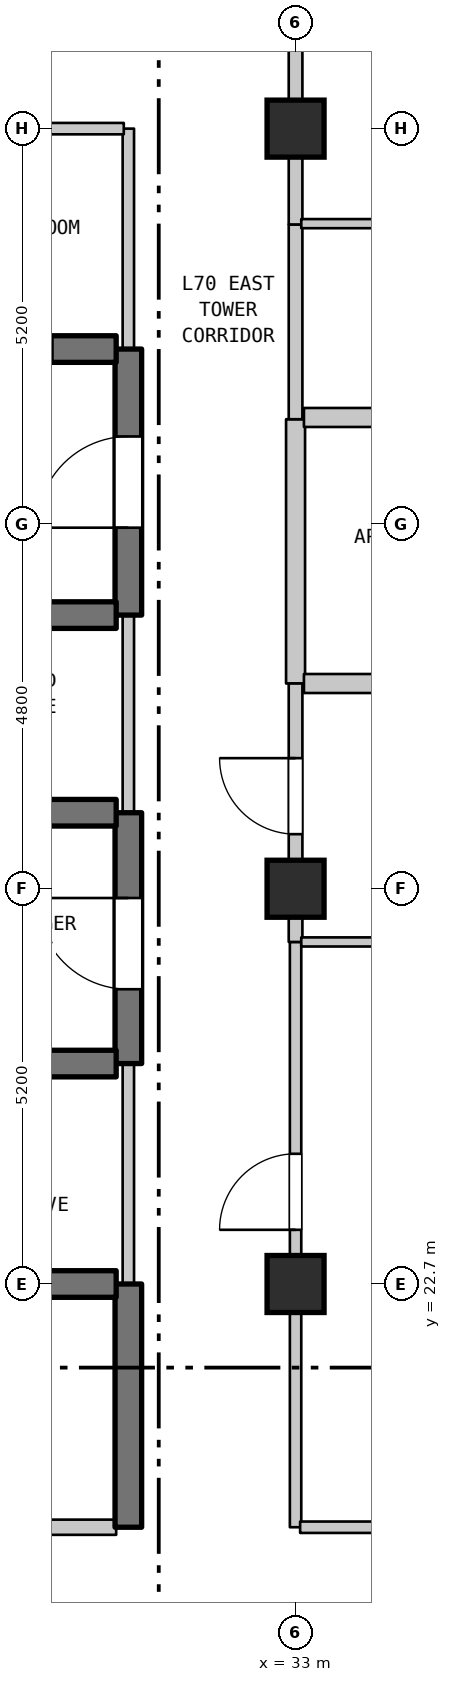
"""IFC4 building model, lengths in metres.
Left out: names, types, materials, properties, quantities, classifications, styles, units other than length and angle.
Written with IfcOpenShell. Run it as: python <this file> out.ifc"""

import sys

from ifc_helpers import new_model, si_unit, direction, frame, frame_2d, origin, origin_2d, place, context, subcontext, project, spatial, rectangle, extrude, element, fill, save


model = new_model("IFC4")
c1 = context("Model", 3, precision=1e-05, world=origin(), true_north=direction((0.0, 1.0)))
c2 = subcontext(c1, "Body", "Model", "MODEL_VIEW")
j1 = project(units=[si_unit("LENGTHUNIT", "METRE"), si_unit("PLANEANGLEUNIT", "RADIAN")], contexts=[c1])
p1 = place(None, origin())
s1 = spatial("IfcSite", under=j1, at=p1, CompositionType="ELEMENT")
p2 = place(p1, origin())
s2 = spatial("IfcBuilding", under=s1, at=p2, CompositionType="ELEMENT")
p3 = place(p2, frame((0.0, 0.0, 280.6)))
s3 = spatial("IfcBuildingStorey", under=s2, at=p3, CompositionType="ELEMENT", Elevation=280.6)
for number, where, z_axis, x_axis in (
    (1, (33.0, 22.7, 0.0), (0.0, 0.0, 1.0), (1.0, 0.0, 0.0)),
    (2, (33.0, 27.9, 0.0), (0.0, 0.0, 1.0), (1.0, 0.0, 0.0)),
    (3, (33.0, 37.9, 0.0), (0.0, 0.0, 1.0), (1.0, 0.0, 0.0)),
):
    element("IfcColumn", number, at=place(p3, frame(where, z_axis=z_axis, x_axis=x_axis)), inside=s3, PredefinedType="COLUMN", context=c2, shape_type="SweptSolid", body=[
        extrude(rectangle(XDim=0.75, YDim=0.75, at=origin_2d()), origin(), (0.0, 0.0, 1.0), 3.7),
    ])
p4 = place(p3, frame((30.8, 19.5, 0.0), z_axis=(0.0, 0.0, 1.0), x_axis=(0.0, 1.0, 0.0)))
e4 = element("IfcWall", 4, at=p4, inside=s3, PredefinedType="SHEAR", context=c2, shape_type="SweptSolid", body=[
    extrude(rectangle(XDim=3.2, YDim=0.35, at=frame_2d((1.6, 0.0))), origin(), (0.0, 0.0, 1.0), 3.39),
])
p5 = place(p3, frame((30.8, 22.7, 0.0), z_axis=(0.0, 0.0, 1.0), x_axis=(0.0, 1.0, 0.0)))
e5 = element("IfcWall", 5, at=p5, inside=s3, PredefinedType="STANDARD", context=c2, shape_type="SweptSolid", body=[
    extrude(rectangle(XDim=2.9, YDim=0.15, at=frame_2d((1.45, 0.0))), origin(), (0.0, 0.0, 1.0), 3.39),
])
p6 = place(p3, frame((30.8, 25.6, 0.0), z_axis=(0.0, 0.0, 1.0), x_axis=(0.0, 1.0, 0.0)))
e6 = element("IfcWall", 6, at=p6, inside=s3, PredefinedType="SHEAR", context=c2, shape_type="SweptSolid", body=[
    extrude(rectangle(XDim=3.3, YDim=0.35, at=frame_2d((1.65, 0.0))), origin(), (0.0, 0.0, 1.0), 3.39),
])
p7 = place(p6, frame((0.978, 0.0, 0.0)))
e7 = element("IfcOpeningElement", 7, at=p7, cuts=e6, PredefinedType="OPENING", context=c2, shape_type="SweptSolid", body=[
    extrude(rectangle(XDim=1.2, YDim=2.2, at=frame_2d((0.6, 1.1))), frame((0.0, 0.185, 0.0), z_axis=(0.0, -1.0, 0.0), x_axis=(1.0, 0.0, 0.0)), (0.0, 0.0, 1.0), 0.37),
])
p8 = place(p3, frame((30.8, 28.9, 0.0), z_axis=(0.0, 0.0, 1.0), x_axis=(0.0, 1.0, 0.0)))
e8 = element("IfcWall", 8, at=p8, inside=s3, PredefinedType="STANDARD", context=c2, shape_type="SweptSolid", body=[
    extrude(rectangle(XDim=2.6, YDim=0.15, at=frame_2d((1.3, 0.0))), origin(), (0.0, 0.0, 1.0), 3.39),
])
p9 = place(p3, frame((30.8, 31.5, 0.0), z_axis=(0.0, 0.0, 1.0), x_axis=(0.0, 1.0, 0.0)))
e9 = element("IfcWall", 9, at=p9, inside=s3, PredefinedType="SHEAR", context=c2, shape_type="SweptSolid", body=[
    extrude(rectangle(XDim=3.5, YDim=0.35, at=frame_2d((1.75, 0.0))), origin(), (0.0, 0.0, 1.0), 3.39),
])
p10 = place(p9, frame((1.15, 0.0, 0.0)))
e10 = element("IfcOpeningElement", 10, at=p10, cuts=e9, PredefinedType="OPENING", context=c2, shape_type="SweptSolid", body=[
    extrude(rectangle(XDim=1.2, YDim=2.2, at=frame_2d((0.6, 1.1))), frame((0.0, 0.185, 0.0), z_axis=(0.0, -1.0, 0.0), x_axis=(1.0, 0.0, 0.0)), (0.0, 0.0, 1.0), 0.37),
])
p11 = place(p3, frame((30.8, 35.0, 0.0), z_axis=(0.0, 0.0, 1.0), x_axis=(0.0, 1.0, 0.0)))
e11 = element("IfcWall", 11, at=p11, inside=s3, PredefinedType="STANDARD", context=c2, shape_type="SweptSolid", body=[
    extrude(rectangle(XDim=2.9, YDim=0.15, at=frame_2d((1.45, 0.0))), origin(), (0.0, 0.0, 1.0), 3.39),
])
p12 = place(p3, frame((33.0, 19.5, 0.0), z_axis=(0.0, 0.0, 1.0), x_axis=(0.0, 1.0, 0.0)))
e12 = element("IfcWall", 12, at=p12, inside=s3, PredefinedType="STANDARD", context=c2, shape_type="SweptSolid", body=[
    extrude(rectangle(XDim=7.7, YDim=0.15, at=frame_2d((3.85, 0.0))), origin(), (0.0, 0.0, 1.0), 3.1),
])
p13 = place(p12, frame((3.913, 0.0, 0.0)))
e13 = element("IfcOpeningElement", 13, at=p13, cuts=e12, PredefinedType="OPENING", context=c2, shape_type="SweptSolid", body=[
    extrude(rectangle(XDim=1.0, YDim=2.15, at=frame_2d((0.5, 1.075))), frame((0.0, 0.085, 0.0), z_axis=(0.0, -1.0, 0.0), x_axis=(1.0, 0.0, 0.0)), (0.0, 0.0, 1.0), 0.17),
])
p14 = place(p3, frame((33.0, 27.2, 0.0), z_axis=(0.0, 0.0, 1.0), x_axis=(0.0, 1.0, 0.0)))
e14 = element("IfcWall", 14, at=p14, inside=s3, PredefinedType="STANDARD", context=c2, shape_type="SweptSolid", body=[
    extrude(rectangle(XDim=0.7, YDim=0.18, at=frame_2d((0.35, 0.0))), origin(), (0.0, 0.0, 1.0), 3.1),
])
p15 = place(p3, frame((33.0, 30.6, 0.0), z_axis=(0.0, 0.0, 1.0), x_axis=(0.0, 1.0, 0.0)))
e15 = element("IfcWall", 15, at=p15, inside=s3, PredefinedType="STANDARD", context=c2, shape_type="SweptSolid", body=[
    extrude(rectangle(XDim=3.477, YDim=0.25, at=frame_2d((1.738, 0.0))), origin(), (0.0, 0.0, 1.0), 2.89),
])
p16 = place(p3, frame((33.0, 34.077, 0.0), z_axis=(0.0, 0.0, 1.0), x_axis=(0.0, 1.0, 0.0)))
e16 = element("IfcWall", 16, at=p16, inside=s3, PredefinedType="STANDARD", context=c2, shape_type="SweptSolid", body=[
    extrude(rectangle(XDim=2.562, YDim=0.18, at=frame_2d((1.281, 0.0))), origin(), (0.0, 0.0, 1.0), 2.89),
])
p17 = place(p3, frame((33.0, 36.639, 0.0), z_axis=(0.0, 0.0, 1.0), x_axis=(0.0, 1.0, 0.0)))
e17 = element("IfcWall", 17, at=p17, inside=s3, PredefinedType="STANDARD", context=c2, shape_type="SweptSolid", body=[
    extrude(rectangle(XDim=1.261, YDim=0.18, at=frame_2d((0.63, 0.0))), origin(), (0.0, 0.0, 1.0), 2.89),
])
p18 = place(p3, frame((25.985, 19.5, 0.0), z_axis=(0.0, 0.0, 1.0), x_axis=(1.0, 0.0, 0.0)))
e18 = element("IfcWall", 18, at=p18, inside=s3, PredefinedType="STANDARD", context=c2, shape_type="SweptSolid", body=[
    extrude(rectangle(XDim=4.655, YDim=0.2, at=frame_2d((2.327, 0.0))), origin(), (0.0, 0.0, 1.0), 3.39),
])
p19 = place(p18, frame((1.845, 0.0, 0.0)))
e19 = element("IfcOpeningElement", 19, at=p19, cuts=e18, PredefinedType="OPENING", context=c2, shape_type="SweptSolid", body=[
    extrude(rectangle(XDim=0.9, YDim=2.15, at=frame_2d((0.45, 1.075))), frame((0.0, 0.11, 0.0), z_axis=(0.0, -1.0, 0.0), x_axis=(1.0, 0.0, 0.0)), (0.0, 0.0, 1.0), 0.22),
])
p20 = place(p3, frame((33.06, 19.5, 0.0), z_axis=(0.0, 0.0, 1.0), x_axis=(1.0, 0.0, 0.0)))
e20 = element("IfcWall", 20, at=p20, inside=s3, PredefinedType="STANDARD", context=c2, shape_type="SweptSolid", body=[
    extrude(rectangle(XDim=8.323, YDim=0.15, at=frame_2d((4.162, 0.0))), origin(), (0.0, 0.0, 1.0), 3.39),
])
p21 = place(p20, frame((3.583, 0.0, 0.0)))
e21 = element("IfcOpeningElement", 21, at=p21, cuts=e20, PredefinedType="OPENING", context=c2, shape_type="SweptSolid", body=[
    extrude(rectangle(XDim=1.0, YDim=2.15, at=frame_2d((0.5, 1.075))), frame((0.0, 0.085, 0.0), z_axis=(0.0, -1.0, 0.0), x_axis=(1.0, 0.0, 0.0)), (0.0, 0.0, 1.0), 0.17),
])
p22 = place(p3, frame((27.46, 22.7, 0.0), z_axis=(0.0, 0.0, 1.0), x_axis=(1.0, 0.0, 0.0)))
e22 = element("IfcWall", 22, at=p22, inside=s3, PredefinedType="SHEAR", context=c2, shape_type="SweptSolid", body=[
    extrude(rectangle(XDim=3.18, YDim=0.35, at=frame_2d((1.59, 0.0))), origin(), (0.0, 0.0, 1.0), 3.39),
])
p23 = place(p3, frame((27.46, 25.6, 0.0), z_axis=(0.0, 0.0, 1.0), x_axis=(1.0, 0.0, 0.0)))
e23 = element("IfcWall", 23, at=p23, inside=s3, PredefinedType="SHEAR", context=c2, shape_type="SweptSolid", body=[
    extrude(rectangle(XDim=3.18, YDim=0.35, at=frame_2d((1.59, 0.0))), origin(), (0.0, 0.0, 1.0), 3.39),
])
p24 = place(p23, frame((1.115, 0.0, 0.0)))
e24 = element("IfcOpeningElement", 24, at=p24, cuts=e23, PredefinedType="OPENING", context=c2, shape_type="SweptSolid", body=[
    extrude(rectangle(XDim=0.95, YDim=2.15, at=frame_2d((0.475, 1.075))), frame((0.0, 0.185, 0.0), z_axis=(0.0, -1.0, 0.0), x_axis=(1.0, 0.0, 0.0)), (0.0, 0.0, 1.0), 0.37),
])
p25 = place(p3, frame((33.075, 27.2, 0.0), z_axis=(0.0, 0.0, 1.0), x_axis=(1.0, 0.0, 0.0)))
e25 = element("IfcWall", 25, at=p25, inside=s3, PredefinedType="PARTITIONING", context=c2, shape_type="SweptSolid", body=[
    extrude(rectangle(XDim=11.816, YDim=0.12, at=frame_2d((5.908, 0.0))), origin(), (0.0, 0.0, 1.0), 3.39),
])
p26 = place(p3, frame((27.46, 28.9, 0.0), z_axis=(0.0, 0.0, 1.0), x_axis=(1.0, 0.0, 0.0)))
e26 = element("IfcWall", 26, at=p26, inside=s3, PredefinedType="SHEAR", context=c2, shape_type="SweptSolid", body=[
    extrude(rectangle(XDim=3.18, YDim=0.35, at=frame_2d((1.59, 0.0))), origin(), (0.0, 0.0, 1.0), 3.39),
])
p27 = place(p26, frame((1.115, 0.0, 0.0)))
e27 = element("IfcOpeningElement", 27, at=p27, cuts=e26, PredefinedType="OPENING", context=c2, shape_type="SweptSolid", body=[
    extrude(rectangle(XDim=0.95, YDim=2.15, at=frame_2d((0.475, 1.075))), frame((0.0, 0.185, 0.0), z_axis=(0.0, -1.0, 0.0), x_axis=(1.0, 0.0, 0.0)), (0.0, 0.0, 1.0), 0.37),
])
p28 = place(p3, frame((33.11, 30.6, 0.0), z_axis=(0.0, 0.0, 1.0), x_axis=(1.0, 0.0, 0.0)))
e28 = element("IfcWall", 28, at=p28, inside=s3, PredefinedType="STANDARD", context=c2, shape_type="SweptSolid", body=[
    extrude(rectangle(XDim=4.36, YDim=0.25, at=frame_2d((2.18, 0.0))), origin(), (0.0, 0.0, 1.0), 3.39),
])
p29 = place(p3, frame((27.46, 31.5, 0.0), z_axis=(0.0, 0.0, 1.0), x_axis=(1.0, 0.0, 0.0)))
e29 = element("IfcWall", 29, at=p29, inside=s3, PredefinedType="SHEAR", context=c2, shape_type="SweptSolid", body=[
    extrude(rectangle(XDim=3.18, YDim=0.35, at=frame_2d((1.59, 0.0))), origin(), (0.0, 0.0, 1.0), 3.39),
])
p30 = place(p3, frame((33.11, 34.1, 0.0), z_axis=(0.0, 0.0, 1.0), x_axis=(1.0, 0.0, 0.0)))
e30 = element("IfcWall", 30, at=p30, inside=s3, PredefinedType="STANDARD", context=c2, shape_type="SweptSolid", body=[
    extrude(rectangle(XDim=4.36, YDim=0.25, at=frame_2d((2.18, 0.0))), origin(), (0.0, 0.0, 1.0), 3.39),
])
p31 = place(p3, frame((28.045, 35.0, 0.0), z_axis=(0.0, 0.0, 1.0), x_axis=(1.0, 0.0, 0.0)))
e31 = element("IfcWall", 31, at=p31, inside=s3, PredefinedType="SHEAR", context=c2, shape_type="SweptSolid", body=[
    extrude(rectangle(XDim=2.595, YDim=0.35, at=frame_2d((1.297, 0.0))), origin(), (0.0, 0.0, 1.0), 3.39),
])
p32 = place(p31, frame((0.806, 0.0, 0.0)))
e32 = element("IfcOpeningElement", 32, at=p32, cuts=e31, PredefinedType="OPENING", context=c2, shape_type="SweptSolid", body=[
    extrude(rectangle(XDim=0.95, YDim=2.15, at=frame_2d((0.475, 1.075))), frame((0.0, 0.185, 0.0), z_axis=(0.0, -1.0, 0.0), x_axis=(1.0, 0.0, 0.0)), (0.0, 0.0, 1.0), 0.37),
])
p33 = place(p3, frame((33.075, 36.65, 0.0), z_axis=(0.0, 0.0, 1.0), x_axis=(1.0, 0.0, 0.0)))
e33 = element("IfcWall", 33, at=p33, inside=s3, PredefinedType="PARTITIONING", context=c2, shape_type="SweptSolid", body=[
    extrude(rectangle(XDim=4.46, YDim=0.12, at=frame_2d((2.23, 0.0))), origin(), (0.0, 0.0, 1.0), 3.39),
])
p34 = place(p3, frame((28.045, 37.9, 0.0), z_axis=(0.0, 0.0, 1.0), x_axis=(1.0, 0.0, 0.0)))
e34 = element("IfcWall", 34, at=p34, inside=s3, PredefinedType="STANDARD", context=c2, shape_type="SweptSolid", body=[
    extrude(rectangle(XDim=2.695, YDim=0.15, at=frame_2d((1.348, 0.0))), origin(), (0.0, 0.0, 1.0), 2.89),
])
p35 = place(p3, frame((33.0, 27.9, 0.0), z_axis=(0.0, 0.0, 1.0), x_axis=(0.0, 1.0, 0.0)))
e35 = element("IfcWall", 35, at=p35, inside=s3, PredefinedType="STANDARD", context=c2, shape_type="SweptSolid", body=[
    extrude(rectangle(XDim=2.7, YDim=0.18, at=frame_2d((1.35, 0.0))), origin(), (0.0, 0.0, 1.0), 2.89),
])
p36 = place(p35, frame((0.718, 0.0, 0.0)))
e36 = element("IfcOpeningElement", 36, at=p36, cuts=e35, PredefinedType="OPENING", context=c2, shape_type="SweptSolid", body=[
    extrude(rectangle(XDim=1.0, YDim=2.15, at=frame_2d((0.5, 1.075))), frame((0.0, 0.1, 0.0), z_axis=(0.0, -1.0, 0.0), x_axis=(1.0, 0.0, 0.0)), (0.0, 0.0, 1.0), 0.2),
])
p37 = place(p3, frame((33.0, 37.9, 0.0), z_axis=(0.0, 0.0, 1.0), x_axis=(0.0, 1.0, 0.0)))
e37 = element("IfcWall", 37, at=p37, inside=s3, PredefinedType="STANDARD", context=c2, shape_type="SweptSolid", body=[
    extrude(rectangle(XDim=1.85, YDim=0.18, at=frame_2d((0.925, 0.0))), origin(), (0.0, 0.0, 1.0), 2.79),
])
p38 = place(p7, origin())
e38 = element("IfcDoor", 38, at=p38, inside=s3, OperationType="SINGLE_SWING_RIGHT", PredefinedType="DOOR", context=c2, shape_type="SweptSolid", body=[
    extrude(rectangle(XDim=1.2, YDim=2.2, at=frame_2d((0.6, 1.1))), frame((0.0, 0.025, 0.0), z_axis=(0.0, -1.0, 0.0), x_axis=(1.0, 0.0, 0.0)), (0.0, 0.0, 1.0), 0.05),
])
fill(e7, e38)
p39 = place(p10, origin())
e39 = element("IfcDoor", 39, at=p39, inside=s3, OperationType="SINGLE_SWING_LEFT", PredefinedType="DOOR", context=c2, shape_type="SweptSolid", body=[
    extrude(rectangle(XDim=1.2, YDim=2.2, at=frame_2d((0.6, 1.1))), frame((0.0, 0.025, 0.0), z_axis=(0.0, -1.0, 0.0), x_axis=(1.0, 0.0, 0.0)), (0.0, 0.0, 1.0), 0.05),
])
fill(e10, e39)
p40 = place(p13, origin())
e40 = element("IfcDoor", 40, at=p40, inside=s3, OperationType="SINGLE_SWING_LEFT", PredefinedType="DOOR", context=c2, shape_type="SweptSolid", body=[
    extrude(rectangle(XDim=1.0, YDim=2.15, at=frame_2d((0.5, 1.075))), frame((0.0, 0.025, 0.0), z_axis=(0.0, -1.0, 0.0), x_axis=(1.0, 0.0, 0.0)), (0.0, 0.0, 1.0), 0.05),
])
fill(e13, e40)
p41 = place(p36, origin())
e41 = element("IfcDoor", 41, at=p41, inside=s3, OperationType="SINGLE_SWING_RIGHT", PredefinedType="DOOR", context=c2, shape_type="SweptSolid", body=[
    extrude(rectangle(XDim=1.0, YDim=2.15, at=frame_2d((0.5, 1.075))), frame((0.0, 0.025, 0.0), z_axis=(0.0, -1.0, 0.0), x_axis=(1.0, 0.0, 0.0)), (0.0, 0.0, 1.0), 0.05),
])
fill(e36, e41)
p42 = place(p32, frame((0.95, 0.0, 0.0), z_axis=(0.0, 0.0, 1.0), x_axis=(-1.0, 0.0, 0.0)))
e42 = element("IfcDoor", 42, at=p42, inside=s3, OperationType="SINGLE_SWING_LEFT", PredefinedType="DOOR", context=c2, shape_type="SweptSolid", body=[
    extrude(rectangle(XDim=0.95, YDim=2.15, at=frame_2d((0.475, 1.075))), frame((0.0, 0.025, 0.0), z_axis=(0.0, -1.0, 0.0), x_axis=(1.0, 0.0, 0.0)), (0.0, 0.0, 1.0), 0.05),
])
fill(e32, e42)
save(model, sys.argv[1])
